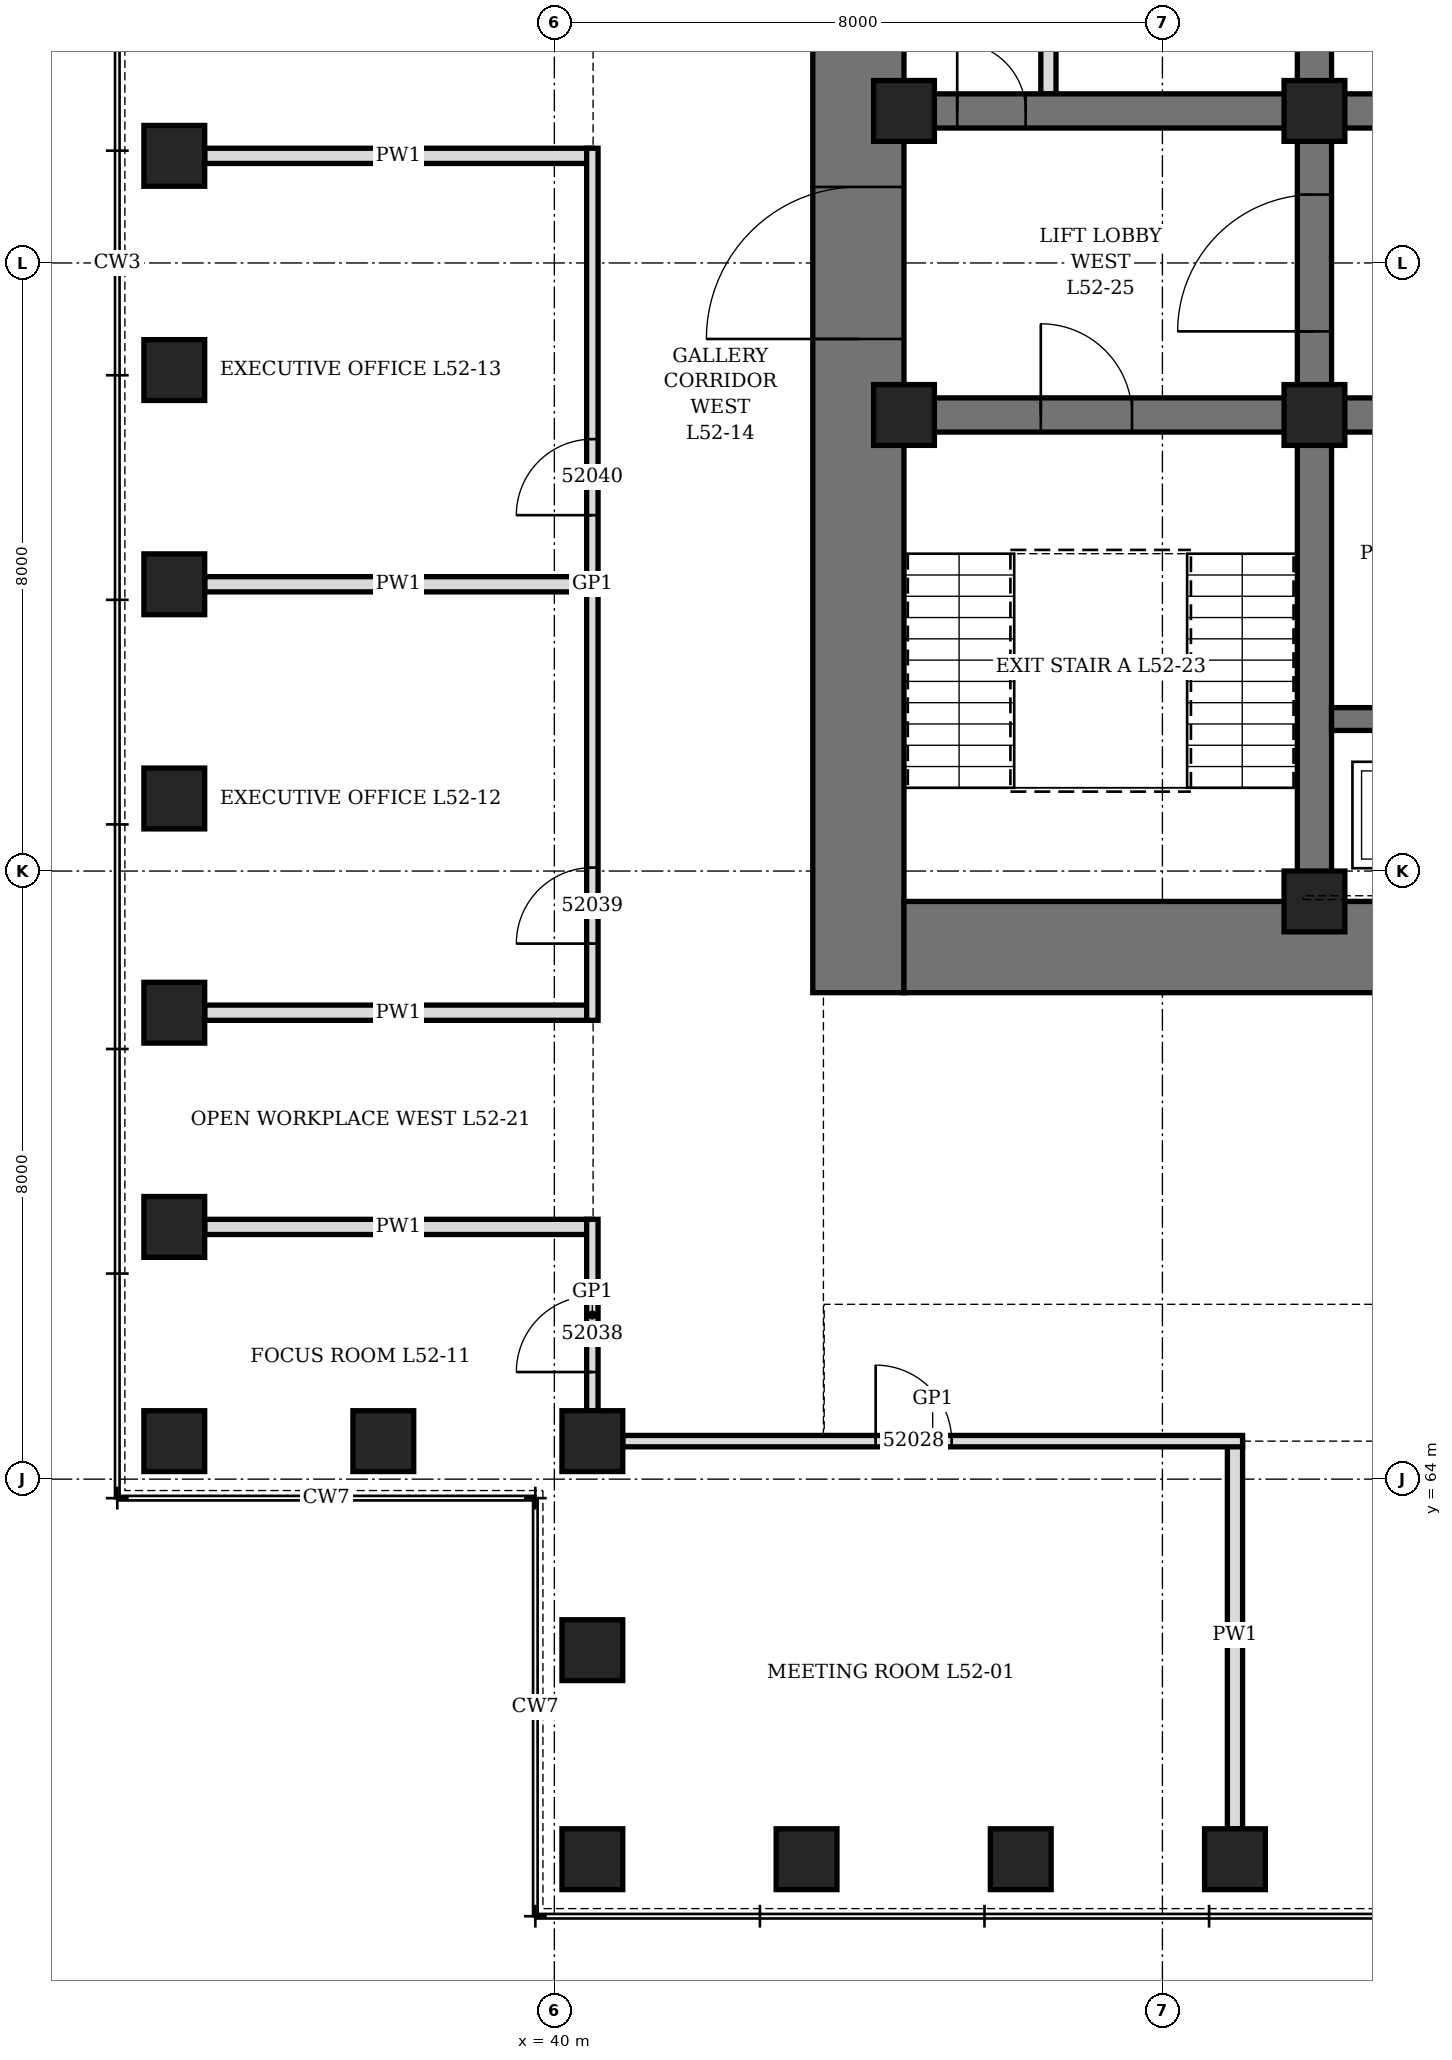
"""IFC4 building model, lengths in metres.
Left out: names, types, materials, properties, quantities, classifications, styles, units other than length and angle.
Written with IfcOpenShell. Run it as: python <this file> out.ifc"""

import sys

from ifc_helpers import new_model, si_unit, direction, frame, frame_2d, origin, origin_2d, place, context, subcontext, project, spatial, rectangle, hollow_rectangle, extrude, element, fill, save


model = new_model("IFC4")
c1 = context("Model", 3, precision=1e-05, world=origin(), true_north=direction((0.0, 1.0)))
c2 = subcontext(c1, "Body", "Model", "MODEL_VIEW")
j1 = project(units=[si_unit("LENGTHUNIT", "METRE"), si_unit("PLANEANGLEUNIT", "RADIAN")], contexts=[c1])
p1 = place(None, origin())
s1 = spatial("IfcSite", under=j1, at=p1, CompositionType="ELEMENT")
p2 = place(p1, origin())
s2 = spatial("IfcBuilding", under=s1, at=p2, CompositionType="ELEMENT")
p3 = place(p2, frame((0.0, 0.0, 231.7)))
s3 = spatial("IfcBuildingStorey", under=s2, at=p3, CompositionType="ELEMENT", Elevation=231.7)
for number, where, z_axis, x_axis in (
    (1, (40.5, 59.0, 0.0), (0.0, 0.0, 1.0), (1.0, 0.0, 0.0)),
    (2, (43.318, 59.0, 0.0), (0.0, 0.0, 1.0), (1.0, 0.0, 0.0)),
    (3, (46.136, 59.0, 0.0), (0.0, 0.0, 1.0), (1.0, 0.0, 0.0)),
    (4, (48.955, 59.0, 0.0), (0.0, 0.0, 1.0), (1.0, 0.0, 0.0)),
    (5, (35.0, 81.409, 0.0), (0.0, 0.0, 1.0), (0.0, 1.0, 0.0)),
    (6, (35.0, 78.591, 0.0), (0.0, 0.0, 1.0), (0.0, 1.0, 0.0)),
    (7, (35.0, 75.773, 0.0), (0.0, 0.0, 1.0), (0.0, 1.0, 0.0)),
    (8, (35.0, 72.955, 0.0), (0.0, 0.0, 1.0), (0.0, 1.0, 0.0)),
    (9, (35.0, 70.136, 0.0), (0.0, 0.0, 1.0), (0.0, 1.0, 0.0)),
    (10, (35.0, 67.318, 0.0), (0.0, 0.0, 1.0), (0.0, 1.0, 0.0)),
    (11, (35.0, 64.5, 0.0), (0.0, 0.0, 1.0), (1.0, 0.0, 0.0)),
    (12, (37.75, 64.5, 0.0), (0.0, 0.0, 1.0), (1.0, 0.0, 0.0)),
    (13, (40.5, 64.5, 0.0), (0.0, 0.0, 1.0), (0.0, 1.0, 0.0)),
    (14, (40.5, 61.75, 0.0), (0.0, 0.0, 1.0), (0.0, 1.0, 0.0)),
):
    element("IfcColumn", number, at=place(p3, frame(where, z_axis=z_axis, x_axis=x_axis)), inside=s3, PredefinedType="COLUMN", context=c2, shape_type="SweptSolid", body=[
        extrude(hollow_rectangle(XDim=0.8, YDim=0.8, WallThickness=0.08, at=origin_2d()), origin(), (0.0, 0.0, 1.0), 4.2),
    ])
p4 = place(p3, frame((44.0, 70.4, 0.0), z_axis=(0.0, 0.0, 1.0), x_axis=(0.0, 1.0, 0.0)))
e15 = element("IfcWall", 15, at=p4, inside=s3, PredefinedType="SHEAR", context=c2, shape_type="SweptSolid", body=[
    extrude(rectangle(XDim=19.2, YDim=1.2, at=frame_2d((9.6, 0.0))), origin(), (0.0, 0.0, 1.0), 4.2),
])
p5 = place(p4, frame((8.6, 0.0, 0.0)))
e16 = element("IfcOpeningElement", 16, at=p5, cuts=e15, PredefinedType="OPENING", context=c2, shape_type="SweptSolid", body=[
    extrude(rectangle(XDim=2.0, YDim=2.4, at=frame_2d((1.0, 1.2))), frame((0.0, 0.61, 0.0), z_axis=(0.0, -1.0, 0.0), x_axis=(1.0, 0.0, 0.0)), (0.0, 0.0, 1.0), 1.22),
])
p6 = place(p3, frame((44.6, 71.0, 0.0), z_axis=(0.0, 0.0, 1.0), x_axis=(1.0, 0.0, 0.0)))
e17 = element("IfcWall", 17, at=p6, inside=s3, PredefinedType="SHEAR", context=c2, shape_type="SweptSolid", body=[
    extrude(rectangle(XDim=22.8, YDim=1.2, at=frame_2d((11.4, 0.0))), origin(), (0.0, 0.0, 1.0), 4.2),
])
p7 = place(p6, frame((6.35, 0.0, 0.0)))
e18 = element("IfcOpeningElement", 18, at=p7, cuts=e17, PredefinedType="OPENING", context=c2, shape_type="SweptSolid", body=[
    extrude(rectangle(XDim=1.1, YDim=2.2, at=frame_2d((0.55, 1.1))), frame((0.0, 0.61, 0.0), z_axis=(0.0, -1.0, 0.0), x_axis=(1.0, 0.0, 0.0)), (0.0, 0.0, 1.0), 1.22),
])
p8 = place(p6, frame((9.35, 0.0, 0.0)))
e19 = element("IfcOpeningElement", 19, at=p8, cuts=e17, PredefinedType="OPENING", context=c2, shape_type="SweptSolid", body=[
    extrude(rectangle(XDim=1.1, YDim=2.2, at=frame_2d((0.55, 1.1))), frame((0.0, 0.61, 0.0), z_axis=(0.0, -1.0, 0.0), x_axis=(1.0, 0.0, 0.0)), (0.0, 0.0, 1.0), 1.22),
])
p9 = place(p6, frame((12.35, 0.0, 0.0)))
e20 = element("IfcOpeningElement", 20, at=p9, cuts=e17, PredefinedType="OPENING", context=c2, shape_type="SweptSolid", body=[
    extrude(rectangle(XDim=1.1, YDim=2.2, at=frame_2d((0.55, 1.1))), frame((0.0, 0.61, 0.0), z_axis=(0.0, -1.0, 0.0), x_axis=(1.0, 0.0, 0.0)), (0.0, 0.0, 1.0), 1.22),
])
p10 = place(p6, frame((15.35, 0.0, 0.0)))
e21 = element("IfcOpeningElement", 21, at=p10, cuts=e17, PredefinedType="OPENING", context=c2, shape_type="SweptSolid", body=[
    extrude(rectangle(XDim=1.1, YDim=2.2, at=frame_2d((0.55, 1.1))), frame((0.0, 0.61, 0.0), z_axis=(0.0, -1.0, 0.0), x_axis=(1.0, 0.0, 0.0)), (0.0, 0.0, 1.0), 1.22),
])
p11 = place(p3, frame((50.0, 71.6, 0.0), z_axis=(0.0, 0.0, 1.0), x_axis=(0.0, 1.0, 0.0)))
e22 = element("IfcWall", 22, at=p11, inside=s3, PredefinedType="SHEAR", context=c2, shape_type="SweptSolid", body=[
    extrude(rectangle(XDim=16.8, YDim=0.45, at=frame_2d((8.4, 0.0))), origin(), (0.0, 0.0, 1.0), 4.2),
])
p12 = place(p11, frame((7.5, 0.0, 0.0)))
e23 = element("IfcOpeningElement", 23, at=p12, cuts=e22, PredefinedType="OPENING", context=c2, shape_type="SweptSolid", body=[
    extrude(rectangle(XDim=1.8, YDim=2.4, at=frame_2d((0.9, 1.2))), frame((0.0, 0.235, 0.0), z_axis=(0.0, -1.0, 0.0), x_axis=(1.0, 0.0, 0.0)), (0.0, 0.0, 1.0), 0.47),
])
p13 = place(p3, frame((44.6, 78.0, 0.0), z_axis=(0.0, 0.0, 1.0), x_axis=(1.0, 0.0, 0.0)))
e24 = element("IfcWall", 24, at=p13, inside=s3, PredefinedType="SHEAR", context=c2, shape_type="SweptSolid", body=[
    extrude(rectangle(XDim=5.175, YDim=0.45, at=frame_2d((2.587, 0.0))), origin(), (0.0, 0.0, 1.0), 4.2),
])
p14 = place(p13, frame((1.8, 0.0, 0.0)))
e25 = element("IfcOpeningElement", 25, at=p14, cuts=e24, PredefinedType="OPENING", context=c2, shape_type="SweptSolid", body=[
    extrude(rectangle(XDim=1.2, YDim=2.1, at=frame_2d((0.6, 1.05))), frame((0.0, 0.235, 0.0), z_axis=(0.0, -1.0, 0.0), x_axis=(1.0, 0.0, 0.0)), (0.0, 0.0, 1.0), 0.47),
])
p15 = place(p3, frame((44.6, 82.0, 0.0), z_axis=(0.0, 0.0, 1.0), x_axis=(1.0, 0.0, 0.0)))
e26 = element("IfcWall", 26, at=p15, inside=s3, PredefinedType="SHEAR", context=c2, shape_type="SweptSolid", body=[
    extrude(rectangle(XDim=5.175, YDim=0.45, at=frame_2d((2.587, 0.0))), origin(), (0.0, 0.0, 1.0), 4.2),
])
p16 = place(p15, frame((0.7, 0.0, 0.0)))
e27 = element("IfcOpeningElement", 27, at=p16, cuts=e26, PredefinedType="OPENING", context=c2, shape_type="SweptSolid", body=[
    extrude(rectangle(XDim=0.9, YDim=2.1, at=frame_2d((0.45, 1.05))), frame((0.0, 0.235, 0.0), z_axis=(0.0, -1.0, 0.0), x_axis=(1.0, 0.0, 0.0)), (0.0, 0.0, 1.0), 0.47),
])
p17 = place(p3, frame((50.225, 78.0, 0.0), z_axis=(0.0, 0.0, 1.0), x_axis=(1.0, 0.0, 0.0)))
e28 = element("IfcWall", 28, at=p17, inside=s3, PredefinedType="SHEAR", context=c2, shape_type="SweptSolid", body=[
    extrude(rectangle(XDim=11.55, YDim=0.45, at=frame_2d((5.775, 0.0))), origin(), (0.0, 0.0, 1.0), 4.2),
])
p18 = place(p17, frame((0.825, 0.0, 0.0)))
e29 = element("IfcOpeningElement", 29, at=p18, cuts=e28, PredefinedType="OPENING", context=c2, shape_type="SweptSolid", body=[
    extrude(rectangle(XDim=0.9, YDim=2.1, at=frame_2d((0.45, 1.05))), frame((0.0, 0.235, 0.0), z_axis=(0.0, -1.0, 0.0), x_axis=(1.0, 0.0, 0.0)), (0.0, 0.0, 1.0), 0.47),
])
p19 = place(p17, frame((3.825, 0.0, 0.0)))
e30 = element("IfcOpeningElement", 30, at=p19, cuts=e28, PredefinedType="OPENING", context=c2, shape_type="SweptSolid", body=[
    extrude(rectangle(XDim=0.9, YDim=2.1, at=frame_2d((0.45, 1.05))), frame((0.0, 0.235, 0.0), z_axis=(0.0, -1.0, 0.0), x_axis=(1.0, 0.0, 0.0)), (0.0, 0.0, 1.0), 0.47),
])
p20 = place(p17, frame((6.825, 0.0, 0.0)))
e31 = element("IfcOpeningElement", 31, at=p20, cuts=e28, PredefinedType="OPENING", context=c2, shape_type="SweptSolid", body=[
    extrude(rectangle(XDim=0.9, YDim=2.1, at=frame_2d((0.45, 1.05))), frame((0.0, 0.235, 0.0), z_axis=(0.0, -1.0, 0.0), x_axis=(1.0, 0.0, 0.0)), (0.0, 0.0, 1.0), 0.47),
])
p21 = place(p17, frame((9.825, 0.0, 0.0)))
e32 = element("IfcOpeningElement", 32, at=p21, cuts=e28, PredefinedType="OPENING", context=c2, shape_type="SweptSolid", body=[
    extrude(rectangle(XDim=0.9, YDim=2.1, at=frame_2d((0.45, 1.05))), frame((0.0, 0.235, 0.0), z_axis=(0.0, -1.0, 0.0), x_axis=(1.0, 0.0, 0.0)), (0.0, 0.0, 1.0), 0.47),
])
p22 = place(p3, frame((50.225, 82.0, 0.0), z_axis=(0.0, 0.0, 1.0), x_axis=(1.0, 0.0, 0.0)))
e33 = element("IfcWall", 33, at=p22, inside=s3, PredefinedType="SHEAR", context=c2, shape_type="SweptSolid", body=[
    extrude(rectangle(XDim=11.55, YDim=0.45, at=frame_2d((5.775, 0.0))), origin(), (0.0, 0.0, 1.0), 4.2),
])
p23 = place(p22, frame((0.825, 0.0, 0.0)))
e34 = element("IfcOpeningElement", 34, at=p23, cuts=e33, PredefinedType="OPENING", context=c2, shape_type="SweptSolid", body=[
    extrude(rectangle(XDim=0.9, YDim=2.1, at=frame_2d((0.45, 1.05))), frame((0.0, 0.235, 0.0), z_axis=(0.0, -1.0, 0.0), x_axis=(1.0, 0.0, 0.0)), (0.0, 0.0, 1.0), 0.47),
])
p24 = place(p22, frame((3.825, 0.0, 0.0)))
e35 = element("IfcOpeningElement", 35, at=p24, cuts=e33, PredefinedType="OPENING", context=c2, shape_type="SweptSolid", body=[
    extrude(rectangle(XDim=0.9, YDim=2.1, at=frame_2d((0.45, 1.05))), frame((0.0, 0.235, 0.0), z_axis=(0.0, -1.0, 0.0), x_axis=(1.0, 0.0, 0.0)), (0.0, 0.0, 1.0), 0.47),
])
p25 = place(p22, frame((6.825, 0.0, 0.0)))
e36 = element("IfcOpeningElement", 36, at=p25, cuts=e33, PredefinedType="OPENING", context=c2, shape_type="SweptSolid", body=[
    extrude(rectangle(XDim=0.9, YDim=2.1, at=frame_2d((0.45, 1.05))), frame((0.0, 0.235, 0.0), z_axis=(0.0, -1.0, 0.0), x_axis=(1.0, 0.0, 0.0)), (0.0, 0.0, 1.0), 0.47),
])
p26 = place(p22, frame((9.825, 0.0, 0.0)))
e37 = element("IfcOpeningElement", 37, at=p26, cuts=e33, PredefinedType="OPENING", context=c2, shape_type="SweptSolid", body=[
    extrude(rectangle(XDim=0.9, YDim=2.1, at=frame_2d((0.45, 1.05))), frame((0.0, 0.235, 0.0), z_axis=(0.0, -1.0, 0.0), x_axis=(1.0, 0.0, 0.0)), (0.0, 0.0, 1.0), 0.47),
])
p27 = place(p3, frame((50.225, 74.0, 0.0), z_axis=(0.0, 0.0, 1.0), x_axis=(1.0, 0.0, 0.0)))
e38 = element("IfcWall", 38, at=p27, inside=s3, PredefinedType="SHEAR", context=c2, shape_type="SweptSolid", body=[
    extrude(rectangle(XDim=11.55, YDim=0.3, at=frame_2d((5.775, 0.0))), origin(), (0.0, 0.0, 1.0), 4.2),
])
for number, where, z_axis, x_axis in (
    (39, (44.6, 78.0, 0.0), (0.0, 0.0, 1.0), (1.0, 0.0, 0.0)),
    (40, (44.6, 82.0, 0.0), (0.0, 0.0, 1.0), (1.0, 0.0, 0.0)),
    (41, (50.0, 71.6, 0.0), (0.0, 0.0, 1.0), (1.0, 0.0, 0.0)),
    (42, (50.0, 78.0, 0.0), (0.0, 0.0, 1.0), (1.0, 0.0, 0.0)),
    (43, (50.0, 82.0, 0.0), (0.0, 0.0, 1.0), (1.0, 0.0, 0.0)),
):
    element("IfcColumn", number, at=place(p3, frame(where, z_axis=z_axis, x_axis=x_axis)), inside=s3, PredefinedType="COLUMN", context=c2, shape_type="SweptSolid", body=[
        extrude(hollow_rectangle(XDim=0.8, YDim=0.8, WallThickness=0.1, at=origin_2d()), origin(), (0.0, 0.0, 1.0), 4.2),
    ])
p28 = place(p3, frame((46.5, 82.225, 0.0), z_axis=(0.0, 0.0, 1.0), x_axis=(0.0, 1.0, 0.0)))
e44 = element("IfcWall", 44, at=p28, inside=s3, PredefinedType="PARTITIONING", context=c2, shape_type="SweptSolid", body=[
    extrude(rectangle(XDim=3.05, YDim=0.2, at=frame_2d((1.525, 0.0))), origin(), (0.0, 0.0, 1.0), 4.04),
])
p29 = place(p28, frame((1.075, 0.0, 0.0)))
e45 = element("IfcOpeningElement", 45, at=p29, cuts=e44, PredefinedType="OPENING", context=c2, shape_type="SweptSolid", body=[
    extrude(rectangle(XDim=0.9, YDim=2.1, at=frame_2d((0.45, 1.05))), frame((0.0, 0.11, 0.0), z_axis=(0.0, -1.0, 0.0), x_axis=(1.0, 0.0, 0.0)), (0.0, 0.0, 1.0), 0.22),
])
for number, where, z_axis, x_axis in (
    (46, (48.955, 59.4, 0.0), (0.0, 0.0, 1.0), (0.0, 1.0, 0.0)),
    (47, (35.4, 67.318, 0.0), (0.0, 0.0, 1.0), (1.0, 0.0, 0.0)),
    (48, (35.4, 70.136, 0.0), (0.0, 0.0, 1.0), (1.0, 0.0, 0.0)),
    (49, (35.4, 75.773, 0.0), (0.0, 0.0, 1.0), (1.0, 0.0, 0.0)),
    (50, (35.4, 81.409, 0.0), (0.0, 0.0, 1.0), (1.0, 0.0, 0.0)),
):
    element("IfcWall", number, at=place(p3, frame(where, z_axis=z_axis, x_axis=x_axis)), inside=s3, PredefinedType="PARTITIONING", context=c2, shape_type="SweptSolid", body=[
        extrude(rectangle(XDim=5.1, YDim=0.2, at=frame_2d((2.55, 0.0))), origin(), (0.0, 0.0, 1.0), 3.428),
    ])
p30 = place(p3, frame((40.9, 64.5, 0.0), z_axis=(0.0, 0.0, 1.0), x_axis=(1.0, 0.0, 0.0)))
e51 = element("IfcWall", 51, at=p30, inside=s3, PredefinedType="PARTITIONING", context=c2, shape_type="SweptSolid", body=[
    extrude(rectangle(XDim=8.155, YDim=0.15, at=frame_2d((4.077, 0.0))), origin(), (0.0, 0.0, 1.0), 4.04),
])
p31 = place(p30, frame((3.327, 0.0, 0.0)))
e52 = element("IfcOpeningElement", 52, at=p31, cuts=e51, PredefinedType="OPENING", context=c2, shape_type="SweptSolid", body=[
    extrude(rectangle(XDim=1.0, YDim=2.4, at=frame_2d((0.5, 1.2))), frame((0.0, 0.085, 0.0), z_axis=(0.0, -1.0, 0.0), x_axis=(1.0, 0.0, 0.0)), (0.0, 0.0, 1.0), 0.17),
])
p32 = place(p3, frame((40.5, 64.9, 0.0), z_axis=(0.0, 0.0, 1.0), x_axis=(0.0, 1.0, 0.0)))
e53 = element("IfcWall", 53, at=p32, inside=s3, PredefinedType="PARTITIONING", context=c2, shape_type="SweptSolid", body=[
    extrude(rectangle(XDim=2.518, YDim=0.15, at=frame_2d((1.259, 0.0))), origin(), (0.0, 0.0, 1.0), 4.04),
])
p33 = place(p32, frame((0.509, 0.0, 0.0)))
e54 = element("IfcOpeningElement", 54, at=p33, cuts=e53, PredefinedType="OPENING", context=c2, shape_type="SweptSolid", body=[
    extrude(rectangle(XDim=1.0, YDim=2.4, at=frame_2d((0.5, 1.2))), frame((0.0, 0.085, 0.0), z_axis=(0.0, -1.0, 0.0), x_axis=(1.0, 0.0, 0.0)), (0.0, 0.0, 1.0), 0.17),
])
p34 = place(p3, frame((40.5, 70.036, 0.0), z_axis=(0.0, 0.0, 1.0), x_axis=(0.0, 1.0, 0.0)))
e55 = element("IfcWall", 55, at=p34, inside=s3, PredefinedType="PARTITIONING", context=c2, shape_type="SweptSolid", body=[
    extrude(rectangle(XDim=11.473, YDim=0.15, at=frame_2d((5.736, 0.0))), origin(), (0.0, 0.0, 1.0), 4.04),
])
p35 = place(p34, frame((1.009, 0.0, 0.0)))
e56 = element("IfcOpeningElement", 56, at=p35, cuts=e55, PredefinedType="OPENING", context=c2, shape_type="SweptSolid", body=[
    extrude(rectangle(XDim=1.0, YDim=2.1, at=frame_2d((0.5, 1.05))), frame((0.0, 0.085, 0.0), z_axis=(0.0, -1.0, 0.0), x_axis=(1.0, 0.0, 0.0)), (0.0, 0.0, 1.0), 0.17),
])
p36 = place(p34, frame((6.646, 0.0, 0.0)))
e57 = element("IfcOpeningElement", 57, at=p36, cuts=e55, PredefinedType="OPENING", context=c2, shape_type="SweptSolid", body=[
    extrude(rectangle(XDim=1.0, YDim=2.1, at=frame_2d((0.5, 1.05))), frame((0.0, 0.085, 0.0), z_axis=(0.0, -1.0, 0.0), x_axis=(1.0, 0.0, 0.0)), (0.0, 0.0, 1.0), 0.17),
])
p37 = place(p16, origin())
e58 = element("IfcDoor", 58, at=p37, inside=s3, OperationType="SINGLE_SWING_LEFT", PredefinedType="DOOR", context=c2, shape_type="SweptSolid", body=[
    extrude(rectangle(XDim=0.9, YDim=2.1, at=frame_2d((0.45, 1.05))), frame((0.0, 0.225, 0.0), z_axis=(0.0, -1.0, 0.0), x_axis=(1.0, 0.0, 0.0)), (0.0, 0.0, 1.0), 0.449),
])
fill(e27, e58)
p38 = place(p14, origin())
e59 = element("IfcDoor", 59, at=p38, inside=s3, OperationType="SINGLE_SWING_LEFT", PredefinedType="DOOR", context=c2, shape_type="SweptSolid", body=[
    extrude(rectangle(XDim=1.2, YDim=2.1, at=frame_2d((0.6, 1.05))), frame((0.0, 0.225, 0.0), z_axis=(0.0, -1.0, 0.0), x_axis=(1.0, 0.0, 0.0)), (0.0, 0.0, 1.0), 0.449),
])
fill(e25, e59)
p39 = place(p5, origin())
e60 = element("IfcDoor", 60, at=p39, inside=s3, OperationType="DOUBLE_DOOR_SINGLE_SWING", PredefinedType="DOOR", context=c2, shape_type="SweptSolid", body=[
    extrude(rectangle(XDim=2.0, YDim=2.4, at=frame_2d((1.0, 1.2))), frame((0.0, 0.35, 0.0), z_axis=(0.0, -1.0, 0.0), x_axis=(1.0, 0.0, 0.0)), (0.0, 0.0, 1.0), 0.7),
])
fill(e16, e60)
p40 = place(p12, origin())
e61 = element("IfcDoor", 61, at=p40, inside=s3, OperationType="DOUBLE_DOOR_SINGLE_SWING", PredefinedType="DOOR", context=c2, shape_type="SweptSolid", body=[
    extrude(rectangle(XDim=1.8, YDim=2.4, at=frame_2d((0.9, 1.2))), frame((0.0, 0.225, 0.0), z_axis=(0.0, -1.0, 0.0), x_axis=(1.0, 0.0, 0.0)), (0.0, 0.0, 1.0), 0.449),
])
fill(e23, e61)
p41 = place(p31, origin())
e62 = element("IfcDoor", 62, at=p41, inside=s3, OperationType="SINGLE_SWING_RIGHT", PredefinedType="DOOR", context=c2, shape_type="SweptSolid", body=[
    extrude(rectangle(XDim=1.0, YDim=2.4, at=frame_2d((0.5, 1.2))), frame((0.0, 0.075, 0.0), z_axis=(0.0, -1.0, 0.0), x_axis=(1.0, 0.0, 0.0)), (0.0, 0.0, 1.0), 0.149),
])
fill(e52, e62)
p42 = place(p33, origin())
e63 = element("IfcDoor", 63, at=p42, inside=s3, OperationType="SINGLE_SWING_RIGHT", PredefinedType="DOOR", context=c2, shape_type="SweptSolid", body=[
    extrude(rectangle(XDim=1.0, YDim=2.4, at=frame_2d((0.5, 1.2))), frame((0.0, 0.075, 0.0), z_axis=(0.0, -1.0, 0.0), x_axis=(1.0, 0.0, 0.0)), (0.0, 0.0, 1.0), 0.149),
])
fill(e54, e63)
p43 = place(p35, origin())
e64 = element("IfcDoor", 64, at=p43, inside=s3, OperationType="SINGLE_SWING_LEFT", PredefinedType="DOOR", context=c2, shape_type="SweptSolid", body=[
    extrude(rectangle(XDim=1.0, YDim=2.1, at=frame_2d((0.5, 1.05))), frame((0.0, 0.075, 0.0), z_axis=(0.0, -1.0, 0.0), x_axis=(1.0, 0.0, 0.0)), (0.0, 0.0, 1.0), 0.149),
])
fill(e56, e64)
p44 = place(p36, origin())
e65 = element("IfcDoor", 65, at=p44, inside=s3, OperationType="SINGLE_SWING_LEFT", PredefinedType="DOOR", context=c2, shape_type="SweptSolid", body=[
    extrude(rectangle(XDim=1.0, YDim=2.1, at=frame_2d((0.5, 1.05))), frame((0.0, 0.075, 0.0), z_axis=(0.0, -1.0, 0.0), x_axis=(1.0, 0.0, 0.0)), (0.0, 0.0, 1.0), 0.149),
])
fill(e57, e65)
save(model, sys.argv[1])
